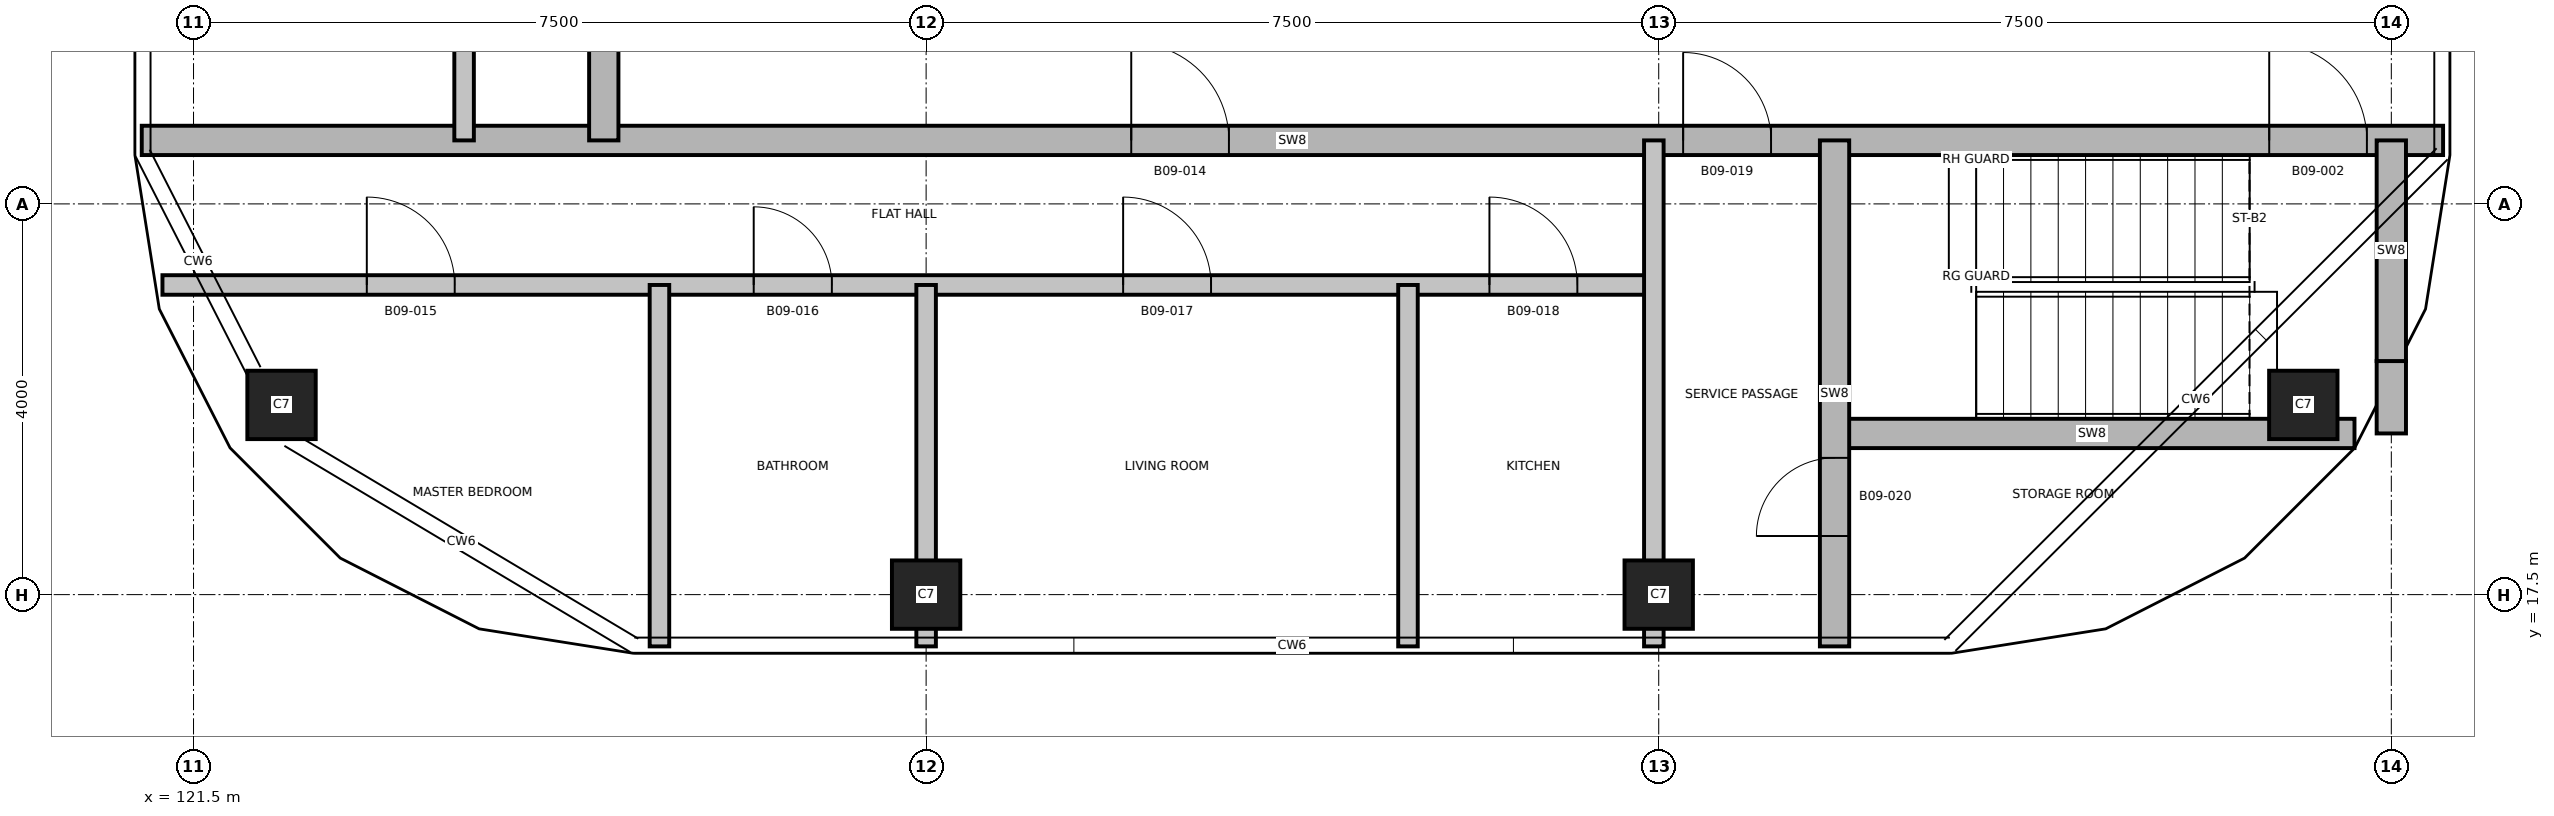
"""IFC4 building model, lengths in metres.
Left out: names, types, materials, properties, quantities, classifications, styles, units other than length and angle.
Written with IfcOpenShell. Run it as: python <this file> out.ifc"""

import sys

from ifc_helpers import new_model, si_unit, direction, frame, frame_2d, origin, origin_2d, place, context, subcontext, project, spatial, rectangle, extrude, element, fill, save


model = new_model("IFC4")
c1 = context("Model", 3, precision=1e-05, world=origin(), true_north=direction((0.0, 1.0)))
c2 = subcontext(c1, "Body", "Model", "MODEL_VIEW")
j1 = project(units=[si_unit("LENGTHUNIT", "METRE"), si_unit("PLANEANGLEUNIT", "RADIAN")], contexts=[c1])
p1 = place(None, origin())
s1 = spatial("IfcSite", under=j1, at=p1, CompositionType="ELEMENT")
p2 = place(p1, origin())
s2 = spatial("IfcBuilding", under=s1, at=p2, CompositionType="ELEMENT")
p3 = place(p2, frame((0.0, 0.0, 98.2)))
s3 = spatial("IfcBuildingStorey", under=s2, at=p3, CompositionType="ELEMENT", Elevation=98.2)
for number, where, z_axis, x_axis in (
    (1, (129.0, 17.5, 0.0), (0.0, 0.0, 1.0), (1.0, 0.0, 0.0)),
    (2, (136.5, 17.5, 0.0), (0.0, 0.0, 1.0), (1.0, 0.0, 0.0)),
    (3, (122.401, 19.442, 0.0), (0.0, 0.0, 1.0), (1.0, 0.0, 0.0)),
    (4, (143.099, 19.442, 0.0), (0.0, 0.0, 1.0), (1.0, 0.0, 0.0)),
):
    element("IfcColumn", number, at=place(p3, frame(where, z_axis=z_axis, x_axis=x_axis)), inside=s3, PredefinedType="COLUMN", context=c2, shape_type="SweptSolid", body=[
        extrude(rectangle(XDim=0.7, YDim=0.7, at=origin_2d()), origin(), (0.0, 0.0, 1.0), 3.7),
    ])
p4 = place(p3, frame((138.25, 19.15, 0.0), z_axis=(0.0, 0.0, 1.0), x_axis=(1.0, 0.0, 0.0)))
e5 = element("IfcWall", 5, at=p4, inside=s3, PredefinedType="SHEAR", context=c2, shape_type="SweptSolid", body=[
    extrude(rectangle(XDim=5.373, YDim=0.3, at=frame_2d((2.687, 0.0))), origin(), (0.0, 0.0, 1.0), 3.4),
])
p5 = place(p3, frame((121.182, 20.67, 0.0), z_axis=(0.0, 0.0, 1.0), x_axis=(1.0, 0.0, 0.0)))
e6 = element("IfcWall", 6, at=p5, inside=s3, PredefinedType="PARTITIONING", context=c2, shape_type="SweptSolid", body=[
    extrude(rectangle(XDim=15.318, YDim=0.2, at=frame_2d((7.659, 0.0))), origin(), (0.0, 0.0, 1.0), 3.4),
])
p6 = place(p5, frame((2.092, 0.0, 0.0)))
e7 = element("IfcOpeningElement", 7, at=p6, cuts=e6, PredefinedType="OPENING", context=c2, shape_type="SweptSolid", body=[
    extrude(rectangle(XDim=0.9, YDim=2.1, at=frame_2d((0.45, 1.05))), frame((0.0, 0.11, 0.0), z_axis=(0.0, -1.0, 0.0), x_axis=(1.0, 0.0, 0.0)), (0.0, 0.0, 1.0), 0.22),
])
p7 = place(p5, frame((6.053, 0.0, 0.0)))
e8 = element("IfcOpeningElement", 8, at=p7, cuts=e6, PredefinedType="OPENING", context=c2, shape_type="SweptSolid", body=[
    extrude(rectangle(XDim=0.8, YDim=2.1, at=frame_2d((0.4, 1.05))), frame((0.0, 0.11, 0.0), z_axis=(0.0, -1.0, 0.0), x_axis=(1.0, 0.0, 0.0)), (0.0, 0.0, 1.0), 0.22),
])
p8 = place(p5, frame((9.835, 0.0, 0.0)))
e9 = element("IfcOpeningElement", 9, at=p8, cuts=e6, PredefinedType="OPENING", context=c2, shape_type="SweptSolid", body=[
    extrude(rectangle(XDim=0.9, YDim=2.1, at=frame_2d((0.45, 1.05))), frame((0.0, 0.11, 0.0), z_axis=(0.0, -1.0, 0.0), x_axis=(1.0, 0.0, 0.0)), (0.0, 0.0, 1.0), 0.22),
])
p9 = place(p5, frame((13.585, 0.0, 0.0)))
e10 = element("IfcOpeningElement", 10, at=p9, cuts=e6, PredefinedType="OPENING", context=c2, shape_type="SweptSolid", body=[
    extrude(rectangle(XDim=0.9, YDim=2.1, at=frame_2d((0.45, 1.05))), frame((0.0, 0.11, 0.0), z_axis=(0.0, -1.0, 0.0), x_axis=(1.0, 0.0, 0.0)), (0.0, 0.0, 1.0), 0.22),
])
p10 = place(p3, frame((120.97, 22.15, 0.0), z_axis=(0.0, 0.0, 1.0), x_axis=(1.0, 0.0, 0.0)))
e11 = element("IfcWall", 11, at=p10, inside=s3, PredefinedType="SHEAR", context=c2, shape_type="SweptSolid", body=[
    extrude(rectangle(XDim=23.56, YDim=0.3, at=frame_2d((11.78, 0.0))), origin(), (0.0, 0.0, 1.0), 3.4),
])
p11 = place(p10, frame((21.78, 0.0, 0.0)))
e12 = element("IfcOpeningElement", 12, at=p11, cuts=e11, PredefinedType="OPENING", context=c2, shape_type="SweptSolid", body=[
    extrude(rectangle(XDim=1.0, YDim=2.1, at=frame_2d((0.5, 1.05))), frame((0.0, 0.16, 0.0), z_axis=(0.0, -1.0, 0.0), x_axis=(1.0, 0.0, 0.0)), (0.0, 0.0, 1.0), 0.32),
])
p12 = place(p10, frame((10.13, 0.0, 0.0)))
e13 = element("IfcOpeningElement", 13, at=p12, cuts=e11, PredefinedType="OPENING", context=c2, shape_type="SweptSolid", body=[
    extrude(rectangle(XDim=1.0, YDim=2.1, at=frame_2d((0.5, 1.05))), frame((0.0, 0.16, 0.0), z_axis=(0.0, -1.0, 0.0), x_axis=(1.0, 0.0, 0.0)), (0.0, 0.0, 1.0), 0.32),
])
p13 = place(p10, frame((15.78, 0.0, 0.0)))
e14 = element("IfcOpeningElement", 14, at=p13, cuts=e11, PredefinedType="OPENING", context=c2, shape_type="SweptSolid", body=[
    extrude(rectangle(XDim=0.9, YDim=2.1, at=frame_2d((0.45, 1.05))), frame((0.0, 0.16, 0.0), z_axis=(0.0, -1.0, 0.0), x_axis=(1.0, 0.0, 0.0)), (0.0, 0.0, 1.0), 0.32),
])
p14 = place(p3, frame((124.27, 22.15, 0.0), z_axis=(0.0, 0.0, 1.0), x_axis=(0.0, 1.0, 0.0)))
e15 = element("IfcWall", 15, at=p14, inside=s3, PredefinedType="PARTITIONING", context=c2, shape_type="SweptSolid", body=[
    extrude(rectangle(XDim=17.7, YDim=0.2, at=frame_2d((8.85, 0.0))), origin(), (0.0, 0.0, 1.0), 3.4),
])
p15 = place(p14, frame((1.725, 0.0, 0.0)))
e16 = element("IfcOpeningElement", 16, at=p15, cuts=e15, PredefinedType="OPENING", context=c2, shape_type="SweptSolid", body=[
    extrude(rectangle(XDim=0.9, YDim=2.1, at=frame_2d((0.45, 1.05))), frame((0.0, 0.11, 0.0), z_axis=(0.0, -1.0, 0.0), x_axis=(1.0, 0.0, 0.0)), (0.0, 0.0, 1.0), 0.22),
])
p16 = place(p14, frame((6.867, 0.0, 0.0)))
e17 = element("IfcOpeningElement", 17, at=p16, cuts=e15, PredefinedType="OPENING", context=c2, shape_type="SweptSolid", body=[
    extrude(rectangle(XDim=0.9, YDim=2.1, at=frame_2d((0.45, 1.05))), frame((0.0, 0.11, 0.0), z_axis=(0.0, -1.0, 0.0), x_axis=(1.0, 0.0, 0.0)), (0.0, 0.0, 1.0), 0.22),
])
p17 = place(p14, frame((11.367, 0.0, 0.0)))
e18 = element("IfcOpeningElement", 18, at=p17, cuts=e15, PredefinedType="OPENING", context=c2, shape_type="SweptSolid", body=[
    extrude(rectangle(XDim=0.9, YDim=2.1, at=frame_2d((0.45, 1.05))), frame((0.0, 0.11, 0.0), z_axis=(0.0, -1.0, 0.0), x_axis=(1.0, 0.0, 0.0)), (0.0, 0.0, 1.0), 0.22),
])
p18 = place(p14, frame((14.378, 0.0, 0.0)))
e19 = element("IfcOpeningElement", 19, at=p18, cuts=e15, PredefinedType="OPENING", context=c2, shape_type="SweptSolid", body=[
    extrude(rectangle(XDim=0.9, YDim=2.1, at=frame_2d((0.45, 1.05))), frame((0.0, 0.11, 0.0), z_axis=(0.0, -1.0, 0.0), x_axis=(1.0, 0.0, 0.0)), (0.0, 0.0, 1.0), 0.22),
])
p19 = place(p14, frame((16.603, 0.0, 0.0)))
e20 = element("IfcOpeningElement", 20, at=p19, cuts=e15, PredefinedType="OPENING", context=c2, shape_type="SweptSolid", body=[
    extrude(rectangle(XDim=0.8, YDim=2.1, at=frame_2d((0.4, 1.05))), frame((0.0, 0.11, 0.0), z_axis=(0.0, -1.0, 0.0), x_axis=(1.0, 0.0, 0.0)), (0.0, 0.0, 1.0), 0.22),
])
p20 = place(p3, frame((125.7, 22.15, 0.0), z_axis=(0.0, 0.0, 1.0), x_axis=(0.0, 1.0, 0.0)))
e21 = element("IfcWall", 21, at=p20, inside=s3, PredefinedType="SHEAR", context=c2, shape_type="SweptSolid", body=[
    extrude(rectangle(XDim=17.7, YDim=0.3, at=frame_2d((8.85, 0.0))), origin(), (0.0, 0.0, 1.0), 3.4),
])
p21 = place(p20, frame((2.7, 0.0, 0.0)))
e22 = element("IfcOpeningElement", 22, at=p21, cuts=e21, PredefinedType="OPENING", context=c2, shape_type="SweptSolid", body=[
    extrude(rectangle(XDim=1.0, YDim=2.1, at=frame_2d((0.5, 1.05))), frame((0.0, 0.16, 0.0), z_axis=(0.0, -1.0, 0.0), x_axis=(1.0, 0.0, 0.0)), (0.0, 0.0, 1.0), 0.32),
])
for number, where, z_axis, x_axis in (
    (23, (126.27, 16.97, 0.0), (0.0, 0.0, 1.0), (0.0, 1.0, 0.0)),
    (24, (129.0, 16.97, 0.0), (0.0, 0.0, 1.0), (0.0, 1.0, 0.0)),
    (25, (133.933, 16.97, 0.0), (0.0, 0.0, 1.0), (0.0, 1.0, 0.0)),
):
    element("IfcWall", number, at=place(p3, frame(where, z_axis=z_axis, x_axis=x_axis)), inside=s3, PredefinedType="PARTITIONING", context=c2, shape_type="SweptSolid", body=[
        extrude(rectangle(XDim=3.7, YDim=0.2, at=frame_2d((1.85, 0.0))), origin(), (0.0, 0.0, 1.0), 3.4),
    ])
p22 = place(p3, frame((136.45, 16.97, 0.0), z_axis=(0.0, 0.0, 1.0), x_axis=(0.0, 1.0, 0.0)))
e26 = element("IfcWall", 26, at=p22, inside=s3, PredefinedType="PARTITIONING", context=c2, shape_type="SweptSolid", body=[
    extrude(rectangle(XDim=5.18, YDim=0.2, at=frame_2d((2.59, 0.0))), origin(), (0.0, 0.0, 1.0), 3.4),
])
p23 = place(p3, frame((138.3, 16.97, 0.0), z_axis=(0.0, 0.0, 1.0), x_axis=(0.0, 1.0, 0.0)))
e27 = element("IfcWall", 27, at=p23, inside=s3, PredefinedType="SHEAR", context=c2, shape_type="SweptSolid", body=[
    extrude(rectangle(XDim=5.18, YDim=0.3, at=frame_2d((2.59, 0.0))), origin(), (0.0, 0.0, 1.0), 3.4),
])
p24 = place(p23, frame((1.13, 0.0, 0.0)))
e28 = element("IfcOpeningElement", 28, at=p24, cuts=e27, PredefinedType="OPENING", context=c2, shape_type="SweptSolid", body=[
    extrude(rectangle(XDim=0.8, YDim=2.1, at=frame_2d((0.4, 1.05))), frame((0.0, 0.16, 0.0), z_axis=(0.0, -1.0, 0.0), x_axis=(1.0, 0.0, 0.0)), (0.0, 0.0, 1.0), 0.32),
])
p25 = place(p3, frame((144.0, 19.15, 0.0), z_axis=(0.0, 0.0, 1.0), x_axis=(0.0, 1.0, 0.0)))
e29 = element("IfcWall", 29, at=p25, inside=s3, PredefinedType="SHEAR", context=c2, shape_type="SweptSolid", body=[
    extrude(rectangle(XDim=0.741, YDim=0.3, at=frame_2d((0.371, 0.0))), origin(), (0.0, 0.0, 1.0), 3.4),
])
p26 = place(p3, frame((144.0, 19.891, 0.0), z_axis=(0.0, 0.0, 1.0), x_axis=(0.0, 1.0, 0.0)))
e30 = element("IfcWall", 30, at=p26, inside=s3, PredefinedType="SHEAR", context=c2, shape_type="SweptSolid", body=[
    extrude(rectangle(XDim=2.259, YDim=0.3, at=frame_2d((1.129, 0.0))), origin(), (0.0, 0.0, 1.0), 3.4),
])
p27 = place(p11, origin())
e31 = element("IfcDoor", 31, at=p27, inside=s3, OperationType="SINGLE_SWING_RIGHT", PredefinedType="DOOR", context=c2, shape_type="SweptSolid", body=[
    extrude(rectangle(XDim=1.0, YDim=2.1, at=frame_2d((0.5, 1.05))), frame((0.0, 0.025, 0.0), z_axis=(0.0, -1.0, 0.0), x_axis=(1.0, 0.0, 0.0)), (0.0, 0.0, 1.0), 0.05),
])
fill(e12, e31)
p28 = place(p12, origin())
e32 = element("IfcDoor", 32, at=p28, inside=s3, OperationType="SINGLE_SWING_RIGHT", PredefinedType="DOOR", context=c2, shape_type="SweptSolid", body=[
    extrude(rectangle(XDim=1.0, YDim=2.1, at=frame_2d((0.5, 1.05))), frame((0.0, 0.025, 0.0), z_axis=(0.0, -1.0, 0.0), x_axis=(1.0, 0.0, 0.0)), (0.0, 0.0, 1.0), 0.05),
])
fill(e13, e32)
p29 = place(p6, origin())
e33 = element("IfcDoor", 33, at=p29, inside=s3, OperationType="SINGLE_SWING_LEFT", PredefinedType="DOOR", context=c2, shape_type="SweptSolid", body=[
    extrude(rectangle(XDim=0.9, YDim=2.1, at=frame_2d((0.45, 1.05))), frame((0.0, 0.025, 0.0), z_axis=(0.0, -1.0, 0.0), x_axis=(1.0, 0.0, 0.0)), (0.0, 0.0, 1.0), 0.05),
])
fill(e7, e33)
p30 = place(p7, origin())
e34 = element("IfcDoor", 34, at=p30, inside=s3, OperationType="SINGLE_SWING_RIGHT", PredefinedType="DOOR", context=c2, shape_type="SweptSolid", body=[
    extrude(rectangle(XDim=0.8, YDim=2.1, at=frame_2d((0.4, 1.05))), frame((0.0, 0.025, 0.0), z_axis=(0.0, -1.0, 0.0), x_axis=(1.0, 0.0, 0.0)), (0.0, 0.0, 1.0), 0.05),
])
fill(e8, e34)
p31 = place(p8, origin())
e35 = element("IfcDoor", 35, at=p31, inside=s3, OperationType="SINGLE_SWING_LEFT", PredefinedType="DOOR", context=c2, shape_type="SweptSolid", body=[
    extrude(rectangle(XDim=0.9, YDim=2.1, at=frame_2d((0.45, 1.05))), frame((0.0, 0.025, 0.0), z_axis=(0.0, -1.0, 0.0), x_axis=(1.0, 0.0, 0.0)), (0.0, 0.0, 1.0), 0.05),
])
fill(e9, e35)
p32 = place(p9, origin())
e36 = element("IfcDoor", 36, at=p32, inside=s3, OperationType="SINGLE_SWING_RIGHT", PredefinedType="DOOR", context=c2, shape_type="SweptSolid", body=[
    extrude(rectangle(XDim=0.9, YDim=2.1, at=frame_2d((0.45, 1.05))), frame((0.0, 0.025, 0.0), z_axis=(0.0, -1.0, 0.0), x_axis=(1.0, 0.0, 0.0)), (0.0, 0.0, 1.0), 0.05),
])
fill(e10, e36)
p33 = place(p13, origin())
e37 = element("IfcDoor", 37, at=p33, inside=s3, OperationType="SINGLE_SWING_LEFT", PredefinedType="DOOR", context=c2, shape_type="SweptSolid", body=[
    extrude(rectangle(XDim=0.9, YDim=2.1, at=frame_2d((0.45, 1.05))), frame((0.0, 0.025, 0.0), z_axis=(0.0, -1.0, 0.0), x_axis=(1.0, 0.0, 0.0)), (0.0, 0.0, 1.0), 0.05),
])
fill(e14, e37)
p34 = place(p24, origin())
e38 = element("IfcDoor", 38, at=p34, inside=s3, OperationType="SINGLE_SWING_RIGHT", PredefinedType="DOOR", context=c2, shape_type="SweptSolid", body=[
    extrude(rectangle(XDim=0.8, YDim=2.1, at=frame_2d((0.4, 1.05))), frame((0.0, 0.025, 0.0), z_axis=(0.0, -1.0, 0.0), x_axis=(1.0, 0.0, 0.0)), (0.0, 0.0, 1.0), 0.05),
])
fill(e28, e38)
save(model, sys.argv[1])
